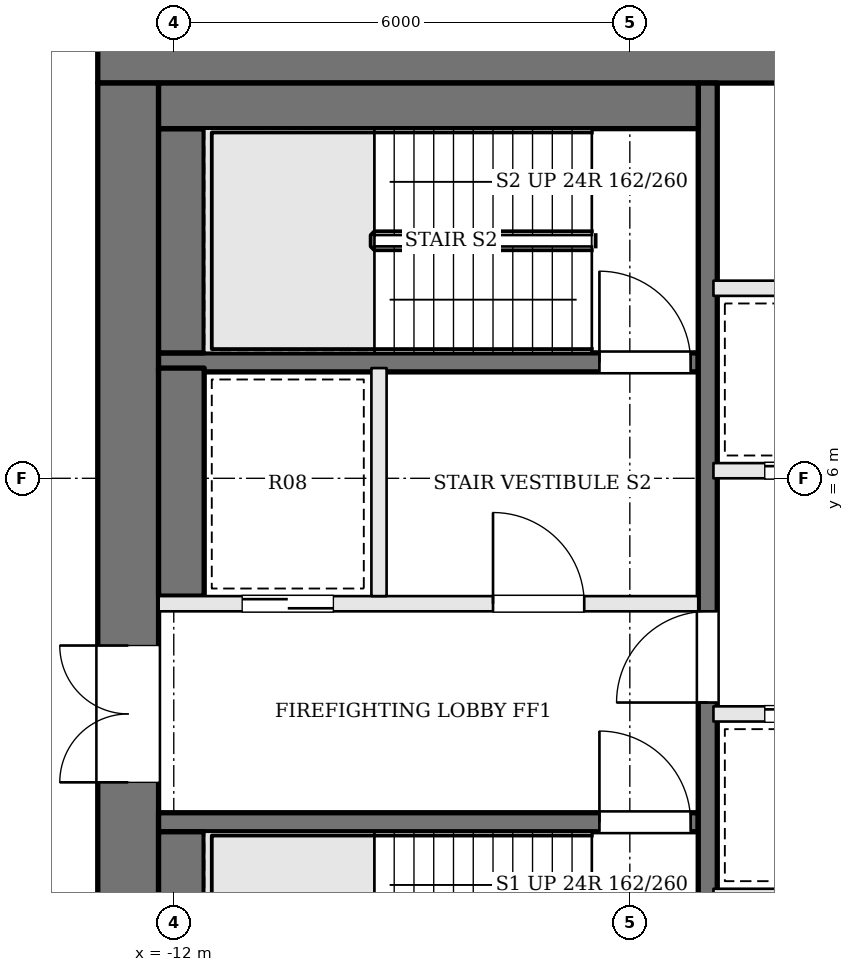
"""IFC4 building model, lengths in metres.
Left out: names, types, materials, properties, quantities, classifications, styles, units other than length and angle.
Written with IfcOpenShell. Run it as: python <this file> out.ifc"""

import sys

from ifc_helpers import new_model, si_unit, direction, frame, frame_2d, origin, place, context, subcontext, project, spatial, rectangle, extrude, element, fill, save


model = new_model("IFC4")
c1 = context("Model", 3, precision=1e-05, world=origin(), true_north=direction((0.0, 1.0)))
c2 = subcontext(c1, "Body", "Model", "MODEL_VIEW")
j1 = project(units=[si_unit("LENGTHUNIT", "METRE"), si_unit("PLANEANGLEUNIT", "RADIAN")], contexts=[c1])
p1 = place(None, origin())
s1 = spatial("IfcSite", under=j1, at=p1, CompositionType="ELEMENT")
p2 = place(p1, origin())
s2 = spatial("IfcBuilding", under=s1, at=p2, CompositionType="ELEMENT")
p3 = place(p2, frame((0.0, 0.0, 276.6)))
s3 = spatial("IfcBuildingStorey", under=s2, at=p3, CompositionType="ELEMENT", Elevation=276.6)
p4 = place(p3, frame((-13.0, 11.6, 0.0), z_axis=(0.0, 0.0, 1.0), x_axis=(1.0, 0.0, 0.0)))
e1 = element("IfcWall", 1, at=p4, inside=s3, PredefinedType="SHEAR", context=c2, shape_type="SweptSolid", body=[
    extrude(rectangle(XDim=26.0, YDim=0.8, at=frame_2d((13.0, 0.0))), origin(), (0.0, 0.0, 1.0), 3.9),
])
p5 = place(p4, frame((9.225, 0.0, 0.0)))
e2 = element("IfcOpeningElement", 2, at=p5, cuts=e1, PredefinedType="OPENING", context=c2, shape_type="SweptSolid", body=[
    extrude(rectangle(XDim=1.0, YDim=2.1, at=frame_2d((0.5, 1.05))), frame((0.0, 0.41, 0.0), z_axis=(0.0, -1.0, 0.0), x_axis=(1.0, 0.0, 0.0)), (0.0, 0.0, 1.0), 0.82),
])
p6 = place(p4, frame((11.825, 0.0, 0.0)))
e3 = element("IfcOpeningElement", 3, at=p6, cuts=e1, PredefinedType="OPENING", context=c2, shape_type="SweptSolid", body=[
    extrude(rectangle(XDim=0.7, YDim=2.1, at=frame_2d((0.35, 1.05))), frame((0.0, 0.41, 0.0), z_axis=(0.0, -1.0, 0.0), x_axis=(1.0, 0.0, 0.0)), (0.0, 0.0, 1.0), 0.82),
])
p7 = place(p4, frame((14.125, 0.0, 0.0)))
e4 = element("IfcOpeningElement", 4, at=p7, cuts=e1, PredefinedType="OPENING", context=c2, shape_type="SweptSolid", body=[
    extrude(rectangle(XDim=1.0, YDim=2.1, at=frame_2d((0.5, 1.05))), frame((0.0, 0.41, 0.0), z_axis=(0.0, -1.0, 0.0), x_axis=(1.0, 0.0, 0.0)), (0.0, 0.0, 1.0), 0.82),
])
p8 = place(p4, frame((16.625, 0.0, 0.0)))
e5 = element("IfcOpeningElement", 5, at=p8, cuts=e1, PredefinedType="OPENING", context=c2, shape_type="SweptSolid", body=[
    extrude(rectangle(XDim=0.9, YDim=2.1, at=frame_2d((0.45, 1.05))), frame((0.0, 0.41, 0.0), z_axis=(0.0, -1.0, 0.0), x_axis=(1.0, 0.0, 0.0)), (0.0, 0.0, 1.0), 0.82),
])
p9 = place(p3, frame((-12.6, -2.2, 0.0), z_axis=(0.0, 0.0, 1.0), x_axis=(0.0, 1.0, 0.0)))
e6 = element("IfcWall", 6, at=p9, inside=s3, PredefinedType="SHEAR", context=c2, shape_type="SweptSolid", body=[
    extrude(rectangle(XDim=13.4, YDim=0.8, at=frame_2d((6.7, 0.0))), origin(), (0.0, 0.0, 1.0), 3.9),
])
p10 = place(p9, frame((4.2, 0.0, 0.0)))
e7 = element("IfcOpeningElement", 7, at=p10, cuts=e6, PredefinedType="OPENING", context=c2, shape_type="SweptSolid", body=[
    extrude(rectangle(XDim=1.8, YDim=2.1, at=frame_2d((0.9, 1.05))), frame((0.0, 0.41, 0.0), z_axis=(0.0, -1.0, 0.0), x_axis=(1.0, 0.0, 0.0)), (0.0, 0.0, 1.0), 0.82),
])
p11 = place(p3, frame((-12.2, 1.475, 0.0), z_axis=(0.0, 0.0, 1.0), x_axis=(1.0, 0.0, 0.0)))
e8 = element("IfcWall", 8, at=p11, inside=s3, PredefinedType="SOLIDWALL", context=c2, shape_type="SweptSolid", body=[
    extrude(rectangle(XDim=7.1, YDim=0.25, at=frame_2d((3.55, 0.0))), origin(), (0.0, 0.0, 1.0), 3.7),
])
p12 = place(p11, frame((5.8, 0.0, 0.0)))
e9 = element("IfcOpeningElement", 9, at=p12, cuts=e8, PredefinedType="OPENING", context=c2, shape_type="SweptSolid", body=[
    extrude(rectangle(XDim=1.2, YDim=2.1, at=frame_2d((0.6, 1.05))), frame((0.0, 0.135, 0.0), z_axis=(0.0, -1.0, 0.0), x_axis=(1.0, 0.0, 0.0)), (0.0, 0.0, 1.0), 0.27),
])
p13 = place(p3, frame((-12.2, 4.35, 0.0), z_axis=(0.0, 0.0, 1.0), x_axis=(1.0, 0.0, 0.0)))
e10 = element("IfcWall", 10, at=p13, inside=s3, PredefinedType="SOLIDWALL", context=c2, shape_type="SweptSolid", body=[
    extrude(rectangle(XDim=7.1, YDim=0.2, at=frame_2d((3.55, 0.0))), origin(), (0.0, 0.0, 1.0), 3.7),
])
p14 = place(p13, frame((4.4, 0.0, 0.0)))
e11 = element("IfcOpeningElement", 11, at=p14, cuts=e10, PredefinedType="OPENING", context=c2, shape_type="SweptSolid", body=[
    extrude(rectangle(XDim=1.2, YDim=2.1, at=frame_2d((0.6, 1.05))), frame((0.0, 0.11, 0.0), z_axis=(0.0, -1.0, 0.0), x_axis=(1.0, 0.0, 0.0)), (0.0, 0.0, 1.0), 0.22),
])
p15 = place(p13, frame((1.1, 0.0, 0.0)))
e12 = element("IfcOpeningElement", 12, at=p15, cuts=e10, PredefinedType="OPENING", context=c2, shape_type="SweptSolid", body=[
    extrude(rectangle(XDim=1.2, YDim=2.1, at=frame_2d((0.6, 1.05))), frame((0.0, 0.11, 0.0), z_axis=(0.0, -1.0, 0.0), x_axis=(1.0, 0.0, 0.0)), (0.0, 0.0, 1.0), 0.22),
])
p16 = place(p3, frame((-12.2, 7.525, 0.0), z_axis=(0.0, 0.0, 1.0), x_axis=(1.0, 0.0, 0.0)))
e13 = element("IfcWall", 13, at=p16, inside=s3, PredefinedType="SOLIDWALL", context=c2, shape_type="SweptSolid", body=[
    extrude(rectangle(XDim=7.1, YDim=0.25, at=frame_2d((3.55, 0.0))), origin(), (0.0, 0.0, 1.0), 3.7),
])
p17 = place(p16, frame((5.8, 0.0, 0.0)))
e14 = element("IfcOpeningElement", 14, at=p17, cuts=e13, PredefinedType="OPENING", context=c2, shape_type="SweptSolid", body=[
    extrude(rectangle(XDim=1.2, YDim=2.1, at=frame_2d((0.6, 1.05))), frame((0.0, 0.135, 0.0), z_axis=(0.0, -1.0, 0.0), x_axis=(1.0, 0.0, 0.0)), (0.0, 0.0, 1.0), 0.27),
])
p18 = place(p3, frame((-9.3, 4.45, 0.0), z_axis=(0.0, 0.0, 1.0), x_axis=(0.0, 1.0, 0.0)))
e15 = element("IfcWall", 15, at=p18, inside=s3, PredefinedType="SOLIDWALL", context=c2, shape_type="SweptSolid", body=[
    extrude(rectangle(XDim=3.0, YDim=0.2, at=frame_2d((1.5, 0.0))), origin(), (0.0, 0.0, 1.0), 3.7),
])
p19 = place(p3, frame((-4.975, -2.2, 0.0), z_axis=(0.0, 0.0, 1.0), x_axis=(0.0, 1.0, 0.0)))
e16 = element("IfcWall", 16, at=p19, inside=s3, PredefinedType="SOLIDWALL", context=c2, shape_type="SweptSolid", body=[
    extrude(rectangle(XDim=13.4, YDim=0.25, at=frame_2d((6.7, 0.0))), origin(), (0.0, 0.0, 1.0), 3.7),
])
p20 = place(p19, frame((5.25, 0.0, 0.0)))
e17 = element("IfcOpeningElement", 17, at=p20, cuts=e16, PredefinedType="OPENING", context=c2, shape_type="SweptSolid", body=[
    extrude(rectangle(XDim=1.2, YDim=2.1, at=frame_2d((0.6, 1.05))), frame((0.0, 0.135, 0.0), z_axis=(0.0, -1.0, 0.0), x_axis=(1.0, 0.0, 0.0)), (0.0, 0.0, 1.0), 0.27),
])
p21 = place(p3, frame((-11.9, -1.6, 0.0), z_axis=(0.0, 0.0, 1.0), x_axis=(0.0, 1.0, 0.0)))
e18 = element("IfcWall", 18, at=p21, inside=s3, PredefinedType="SOLIDWALL", context=c2, shape_type="SweptSolid", body=[
    extrude(rectangle(XDim=2.95, YDim=0.6, at=frame_2d((1.475, 0.0))), origin(), (0.0, 0.0, 1.0), 3.7),
])
p22 = place(p3, frame((-11.9, 4.45, 0.0), z_axis=(0.0, 0.0, 1.0), x_axis=(0.0, 1.0, 0.0)))
e19 = element("IfcWall", 19, at=p22, inside=s3, PredefinedType="SOLIDWALL", context=c2, shape_type="SweptSolid", body=[
    extrude(rectangle(XDim=3.0, YDim=0.6, at=frame_2d((1.5, 0.0))), origin(), (0.0, 0.0, 1.0), 3.7),
])
p23 = place(p3, frame((-11.9, 7.65, 0.0), z_axis=(0.0, 0.0, 1.0), x_axis=(0.0, 1.0, 0.0)))
e20 = element("IfcWall", 20, at=p23, inside=s3, PredefinedType="SOLIDWALL", context=c2, shape_type="SweptSolid", body=[
    extrude(rectangle(XDim=2.95, YDim=0.6, at=frame_2d((1.475, 0.0))), origin(), (0.0, 0.0, 1.0), 3.7),
])
p24 = place(p3, frame((-12.2, 10.9, 0.0), z_axis=(0.0, 0.0, 1.0), x_axis=(1.0, 0.0, 0.0)))
e21 = element("IfcWall", 21, at=p24, inside=s3, PredefinedType="SOLIDWALL", context=c2, shape_type="SweptSolid", body=[
    extrude(rectangle(XDim=7.1, YDim=0.6, at=frame_2d((3.55, 0.0))), origin(), (0.0, 0.0, 1.0), 3.7),
])
p25 = place(p3, frame((-4.9, 0.5, 0.0), z_axis=(0.0, 0.0, 1.0), x_axis=(1.0, 0.0, 0.0)))
e22 = element("IfcWall", 22, at=p25, inside=s3, PredefinedType="SOLIDWALL", context=c2, shape_type="SweptSolid", body=[
    extrude(rectangle(XDim=9.8, YDim=0.2, at=frame_2d((4.9, 0.0))), origin(), (0.0, 0.0, 1.0), 3.7),
])
p26 = place(p3, frame((-4.9, 2.9, 0.0), z_axis=(0.0, 0.0, 1.0), x_axis=(1.0, 0.0, 0.0)))
e23 = element("IfcWall", 23, at=p26, inside=s3, PredefinedType="SOLIDWALL", context=c2, shape_type="SweptSolid", body=[
    extrude(rectangle(XDim=9.8, YDim=0.2, at=frame_2d((4.9, 0.0))), origin(), (0.0, 0.0, 1.0), 3.7),
])
p27 = place(p26, frame((0.675, 0.0, 0.0)))
e24 = element("IfcOpeningElement", 24, at=p27, cuts=e23, PredefinedType="OPENING", context=c2, shape_type="SweptSolid", body=[
    extrude(rectangle(XDim=1.1, YDim=2.1, at=frame_2d((0.55, 1.05))), frame((0.0, 0.11, 0.0), z_axis=(0.0, -1.0, 0.0), x_axis=(1.0, 0.0, 0.0)), (0.0, 0.0, 1.0), 0.22),
])
p28 = place(p26, frame((2.613, 0.0, 0.0)))
e25 = element("IfcOpeningElement", 25, at=p28, cuts=e23, PredefinedType="OPENING", context=c2, shape_type="SweptSolid", body=[
    extrude(rectangle(XDim=0.9, YDim=2.1, at=frame_2d((0.45, 1.05))), frame((0.0, 0.11, 0.0), z_axis=(0.0, -1.0, 0.0), x_axis=(1.0, 0.0, 0.0)), (0.0, 0.0, 1.0), 0.22),
])
p29 = place(p26, frame((4.35, 0.0, 0.0)))
e26 = element("IfcOpeningElement", 26, at=p29, cuts=e23, PredefinedType="OPENING", context=c2, shape_type="SweptSolid", body=[
    extrude(rectangle(XDim=1.1, YDim=2.1, at=frame_2d((0.55, 1.05))), frame((0.0, 0.11, 0.0), z_axis=(0.0, -1.0, 0.0), x_axis=(1.0, 0.0, 0.0)), (0.0, 0.0, 1.0), 0.22),
])
p30 = place(p26, frame((7.463, 0.0, 0.0)))
e27 = element("IfcOpeningElement", 27, at=p30, cuts=e23, PredefinedType="OPENING", context=c2, shape_type="SweptSolid", body=[
    extrude(rectangle(XDim=1.0, YDim=2.1, at=frame_2d((0.5, 1.05))), frame((0.0, 0.11, 0.0), z_axis=(0.0, -1.0, 0.0), x_axis=(1.0, 0.0, 0.0)), (0.0, 0.0, 1.0), 0.22),
])
p31 = place(p3, frame((-4.9, 6.1, 0.0), z_axis=(0.0, 0.0, 1.0), x_axis=(1.0, 0.0, 0.0)))
e28 = element("IfcWall", 28, at=p31, inside=s3, PredefinedType="SOLIDWALL", context=c2, shape_type="SweptSolid", body=[
    extrude(rectangle(XDim=9.8, YDim=0.2, at=frame_2d((4.9, 0.0))), origin(), (0.0, 0.0, 1.0), 3.7),
])
p32 = place(p31, frame((0.675, 0.0, 0.0)))
e29 = element("IfcOpeningElement", 29, at=p32, cuts=e28, PredefinedType="OPENING", context=c2, shape_type="SweptSolid", body=[
    extrude(rectangle(XDim=1.1, YDim=2.1, at=frame_2d((0.55, 1.05))), frame((0.0, 0.11, 0.0), z_axis=(0.0, -1.0, 0.0), x_axis=(1.0, 0.0, 0.0)), (0.0, 0.0, 1.0), 0.22),
])
p33 = place(p31, frame((3.125, 0.0, 0.0)))
e30 = element("IfcOpeningElement", 30, at=p33, cuts=e28, PredefinedType="OPENING", context=c2, shape_type="SweptSolid", body=[
    extrude(rectangle(XDim=1.1, YDim=2.1, at=frame_2d((0.55, 1.05))), frame((0.0, 0.11, 0.0), z_axis=(0.0, -1.0, 0.0), x_axis=(1.0, 0.0, 0.0)), (0.0, 0.0, 1.0), 0.22),
])
p34 = place(p31, frame((5.575, 0.0, 0.0)))
e31 = element("IfcOpeningElement", 31, at=p34, cuts=e28, PredefinedType="OPENING", context=c2, shape_type="SweptSolid", body=[
    extrude(rectangle(XDim=1.1, YDim=2.1, at=frame_2d((0.55, 1.05))), frame((0.0, 0.11, 0.0), z_axis=(0.0, -1.0, 0.0), x_axis=(1.0, 0.0, 0.0)), (0.0, 0.0, 1.0), 0.22),
])
p35 = place(p31, frame((8.025, 0.0, 0.0)))
e32 = element("IfcOpeningElement", 32, at=p35, cuts=e28, PredefinedType="OPENING", context=c2, shape_type="SweptSolid", body=[
    extrude(rectangle(XDim=1.1, YDim=2.1, at=frame_2d((0.55, 1.05))), frame((0.0, 0.11, 0.0), z_axis=(0.0, -1.0, 0.0), x_axis=(1.0, 0.0, 0.0)), (0.0, 0.0, 1.0), 0.22),
])
p36 = place(p3, frame((-4.9, 8.5, 0.0), z_axis=(0.0, 0.0, 1.0), x_axis=(1.0, 0.0, 0.0)))
e33 = element("IfcWall", 33, at=p36, inside=s3, PredefinedType="SOLIDWALL", context=c2, shape_type="SweptSolid", body=[
    extrude(rectangle(XDim=9.8, YDim=0.2, at=frame_2d((4.9, 0.0))), origin(), (0.0, 0.0, 1.0), 3.7),
])
p37 = place(p10, origin())
e34 = element("IfcDoor", 34, at=p37, inside=s3, OperationType="DOUBLE_DOOR_SINGLE_SWING", PredefinedType="DOOR", context=c2, shape_type="SweptSolid", body=[
    extrude(rectangle(XDim=1.8, YDim=2.1, at=frame_2d((0.9, 1.05))), frame((0.0, 0.025, 0.0), z_axis=(0.0, -1.0, 0.0), x_axis=(1.0, 0.0, 0.0)), (0.0, 0.0, 1.0), 0.05),
])
fill(e7, e34)
p38 = place(p20, origin())
e35 = element("IfcDoor", 35, at=p38, inside=s3, OperationType="SINGLE_SWING_LEFT", PredefinedType="DOOR", context=c2, shape_type="SweptSolid", body=[
    extrude(rectangle(XDim=1.2, YDim=2.1, at=frame_2d((0.6, 1.05))), frame((0.0, 0.025, 0.0), z_axis=(0.0, -1.0, 0.0), x_axis=(1.0, 0.0, 0.0)), (0.0, 0.0, 1.0), 0.05),
])
fill(e17, e35)
p39 = place(p14, origin())
e36 = element("IfcDoor", 36, at=p39, inside=s3, OperationType="SINGLE_SWING_LEFT", PredefinedType="DOOR", context=c2, shape_type="SweptSolid", body=[
    extrude(rectangle(XDim=1.2, YDim=2.1, at=frame_2d((0.6, 1.05))), frame((0.0, 0.025, 0.0), z_axis=(0.0, -1.0, 0.0), x_axis=(1.0, 0.0, 0.0)), (0.0, 0.0, 1.0), 0.05),
])
fill(e11, e36)
p40 = place(p12, origin())
e37 = element("IfcDoor", 37, at=p40, inside=s3, OperationType="SINGLE_SWING_LEFT", PredefinedType="DOOR", context=c2, shape_type="SweptSolid", body=[
    extrude(rectangle(XDim=1.2, YDim=2.1, at=frame_2d((0.6, 1.05))), frame((0.0, 0.025, 0.0), z_axis=(0.0, -1.0, 0.0), x_axis=(1.0, 0.0, 0.0)), (0.0, 0.0, 1.0), 0.05),
])
fill(e9, e37)
p41 = place(p17, origin())
e38 = element("IfcDoor", 38, at=p41, inside=s3, OperationType="SINGLE_SWING_LEFT", PredefinedType="DOOR", context=c2, shape_type="SweptSolid", body=[
    extrude(rectangle(XDim=1.2, YDim=2.1, at=frame_2d((0.6, 1.05))), frame((0.0, 0.025, 0.0), z_axis=(0.0, -1.0, 0.0), x_axis=(1.0, 0.0, 0.0)), (0.0, 0.0, 1.0), 0.05),
])
fill(e14, e38)
p42 = place(p15, origin())
e39 = element("IfcDoor", 39, at=p42, inside=s3, OperationType="SLIDING_TO_RIGHT", PredefinedType="DOOR", context=c2, shape_type="SweptSolid", body=[
    extrude(rectangle(XDim=1.2, YDim=2.1, at=frame_2d((0.6, 1.05))), frame((0.0, 0.025, 0.0), z_axis=(0.0, -1.0, 0.0), x_axis=(1.0, 0.0, 0.0)), (0.0, 0.0, 1.0), 0.05),
])
fill(e12, e39)
p43 = place(p27, origin())
e40 = element("IfcDoor", 40, at=p43, inside=s3, OperationType="SLIDING_TO_RIGHT", PredefinedType="DOOR", context=c2, shape_type="SweptSolid", body=[
    extrude(rectangle(XDim=1.1, YDim=2.1, at=frame_2d((0.55, 1.05))), frame((0.0, 0.025, 0.0), z_axis=(0.0, -1.0, 0.0), x_axis=(1.0, 0.0, 0.0)), (0.0, 0.0, 1.0), 0.05),
])
fill(e24, e40)
p44 = place(p32, origin())
e41 = element("IfcDoor", 41, at=p44, inside=s3, OperationType="SLIDING_TO_RIGHT", PredefinedType="DOOR", context=c2, shape_type="SweptSolid", body=[
    extrude(rectangle(XDim=1.1, YDim=2.1, at=frame_2d((0.55, 1.05))), frame((0.0, 0.025, 0.0), z_axis=(0.0, -1.0, 0.0), x_axis=(1.0, 0.0, 0.0)), (0.0, 0.0, 1.0), 0.05),
])
fill(e29, e41)
save(model, sys.argv[1])
